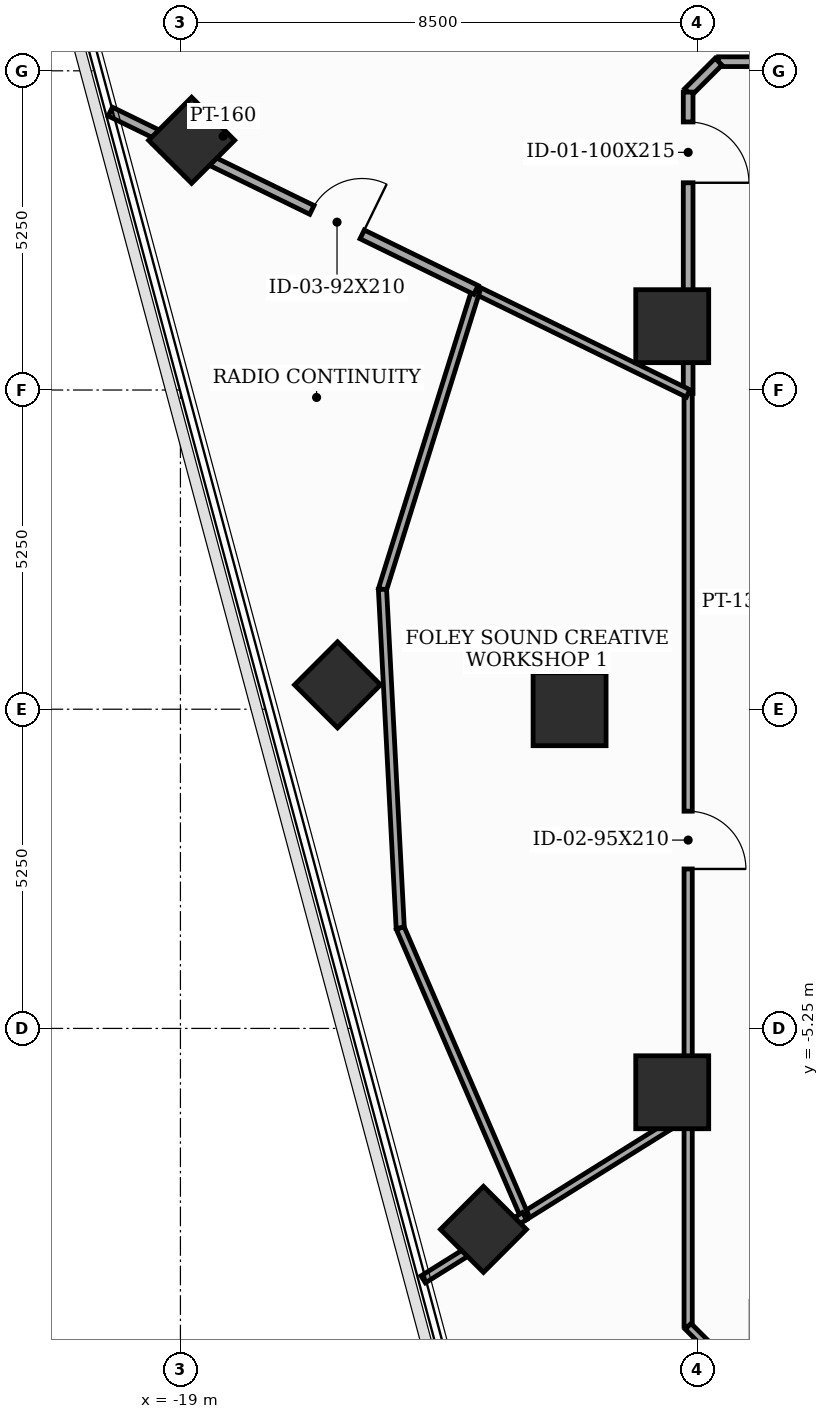
"""IFC4 building model, lengths in metres.
Left out: names, types, materials, properties, quantities, classifications, styles, units other than length and angle.
Written with IfcOpenShell. Run it as: python <this file> out.ifc"""

import sys

from ifc_helpers import new_model, si_unit, direction, frame, frame_2d, origin, origin_2d, place, context, subcontext, project, spatial, rectangle, extrude, element, fill, save


model = new_model("IFC4")
c1 = context("Model", 3, precision=1e-05, world=origin(), true_north=direction((0.0, 1.0)))
c2 = subcontext(c1, "Body", "Model", "MODEL_VIEW")
j1 = project(units=[si_unit("LENGTHUNIT", "METRE"), si_unit("PLANEANGLEUNIT", "RADIAN")], contexts=[c1])
p1 = place(None, origin())
s1 = spatial("IfcSite", under=j1, at=p1, CompositionType="ELEMENT")
p2 = place(p1, origin())
s2 = spatial("IfcBuilding", under=s1, at=p2, CompositionType="ELEMENT")
p3 = place(p2, frame((0.0, 0.0, 184.2)))
s3 = spatial("IfcBuildingStorey", under=s2, at=p3, CompositionType="ELEMENT", Elevation=184.2)
for number, where, z_axis, x_axis in (
    (1, (-10.912, 6.3, 0.0), (0.0, 0.0, 1.0), (1.0, 0.0, 0.0)),
    (2, (-12.6, 0.0, 0.0), (0.0, 0.0, 1.0), (1.0, 0.0, 0.0)),
    (3, (-10.912, -6.3, 0.0), (0.0, 0.0, 1.0), (1.0, 0.0, 0.0)),
):
    element("IfcColumn", number, at=place(p3, frame(where, z_axis=z_axis, x_axis=x_axis)), inside=s3, PredefinedType="COLUMN", context=c2, shape_type="SweptSolid", body=[
        extrude(rectangle(XDim=1.2, YDim=1.2, at=origin_2d()), origin(), (0.0, 0.0, 1.0), 3.7),
    ])
for number, where, z_axis, x_axis in (
    (4, (-18.816, 9.357, 0.0), (0.0, 0.0, 1.0), (0.707, 0.707, 0.0)),
    (5, (-16.416, 0.401, 0.0), (0.0, 0.0, 1.0), (0.707, 0.707, 0.0)),
    (6, (-14.016, -8.555, 0.0), (0.0, 0.0, 1.0), (0.707, 0.707, 0.0)),
):
    element("IfcColumn", number, at=place(p3, frame(where, z_axis=z_axis, x_axis=x_axis)), inside=s3, PredefinedType="COLUMN", context=c2, shape_type="SweptSolid", body=[
        extrude(rectangle(XDim=1.0, YDim=1.0, at=origin_2d()), origin(), (0.0, 0.0, 1.0), 3.7),
    ])
p4 = place(p3, frame((-10.65, 5.194, 0.0), z_axis=(0.0, 0.0, 1.0), x_axis=(0.0, -1.0, 0.0)))
e7 = element("IfcWall", 7, at=p4, inside=s3, PredefinedType="PARTITIONING", context=c2, shape_type="SweptSolid", body=[
    extrude(rectangle(XDim=11.849, YDim=0.135, at=frame_2d((5.925, 0.0))), origin(), (0.0, 0.0, 1.0), 2.885),
])
p5 = place(p4, frame((6.871, 0.0, 0.0)))
e8 = element("IfcOpeningElement", 8, at=p5, cuts=e7, PredefinedType="OPENING", context=c2, shape_type="SweptSolid", body=[
    extrude(rectangle(XDim=0.95, YDim=2.1, at=frame_2d((0.475, 1.05))), frame((0.0, 0.077, 0.0), z_axis=(0.0, -1.0, 0.0), x_axis=(1.0, 0.0, 0.0)), (0.0, 0.0, 1.0), 0.155),
])
p6 = place(p3, frame((-10.65, -6.655, 0.0), z_axis=(0.0, 0.0, 1.0), x_axis=(0.0, -1.0, 0.0)))
e9 = element("IfcWall", 9, at=p6, inside=s3, PredefinedType="PARTITIONING", context=c2, shape_type="SweptSolid", body=[
    extrude(rectangle(XDim=3.495, YDim=0.135, at=frame_2d((1.748, 0.0))), origin(), (0.0, 0.0, 1.0), 2.885),
])
p7 = place(p3, frame((-10.65, -10.15, 0.0), z_axis=(0.0, 0.0, 1.0), x_axis=(0.707106781187, -0.707106781187, 0.0)))
e10 = element("IfcWall", 10, at=p7, inside=s3, PredefinedType="PARTITIONING", context=c2, shape_type="SweptSolid", body=[
    extrude(rectangle(XDim=0.707, YDim=0.135, at=frame_2d((0.354, 0.0))), origin(), (0.0, 0.0, 1.0), 3.5),
])
p8 = place(p3, frame((-2.264, 10.65, 0.0), z_axis=(0.0, 0.0, 1.0), x_axis=(-1.0, 0.0, 0.0)))
e11 = element("IfcWall", 11, at=p8, inside=s3, PredefinedType="PARTITIONING", context=c2, shape_type="SweptSolid", body=[
    extrude(rectangle(XDim=7.886, YDim=0.16, at=frame_2d((3.943, 0.0))), origin(), (0.0, 0.0, 1.0), 2.885),
])
p9 = place(p3, frame((-10.15, 10.65, 0.0), z_axis=(0.0, 0.0, 1.0), x_axis=(-0.707106781187, -0.707106781187, 0.0)))
e12 = element("IfcWall", 12, at=p9, inside=s3, PredefinedType="PARTITIONING", context=c2, shape_type="SweptSolid", body=[
    extrude(rectangle(XDim=0.707, YDim=0.16, at=frame_2d((0.354, 0.0))), origin(), (0.0, 0.0, 1.0), 3.5),
])
p10 = place(p3, frame((-10.65, 10.15, 0.0), z_axis=(0.0, 0.0, 1.0), x_axis=(0.0, -1.0, 0.0)))
e13 = element("IfcWall", 13, at=p10, inside=s3, PredefinedType="PARTITIONING", context=c2, shape_type="SweptSolid", body=[
    extrude(rectangle(XDim=4.956, YDim=0.16, at=frame_2d((2.478, 0.0))), origin(), (0.0, 0.0, 1.0), 2.885),
])
p11 = place(p10, frame((0.491, 0.0, 0.0)))
e14 = element("IfcOpeningElement", 14, at=p11, cuts=e13, PredefinedType="OPENING", context=c2, shape_type="SweptSolid", body=[
    extrude(rectangle(XDim=1.0, YDim=2.15, at=frame_2d((0.5, 1.075))), frame((0.0, 0.09, 0.0), z_axis=(0.0, -1.0, 0.0), x_axis=(1.0, 0.0, 0.0)), (0.0, 0.0, 1.0), 0.18),
])
p12 = place(p3, frame((-13.341, -8.336, 0.0), z_axis=(0.0, 0.0, 1.0), x_axis=(0.848149563096, 0.529756848582, 0.0)))
e15 = element("IfcWall", 15, at=p12, inside=s3, PredefinedType="PARTITIONING", context=c2, shape_type="SweptSolid", body=[
    extrude(rectangle(XDim=3.173, YDim=0.135, at=frame_2d((1.586, 0.0))), origin(), (0.0, 0.0, 1.0), 2.885),
])
p13 = place(p3, frame((-10.65, 5.194, 0.0), z_axis=(0.0, 0.0, 1.0), x_axis=(-0.898773885441, 0.438412480261, 0.0)))
e16 = element("IfcWall", 16, at=p13, inside=s3, PredefinedType="PARTITIONING", context=c2, shape_type="SweptSolid", body=[
    extrude(rectangle(XDim=3.882, YDim=0.135, at=frame_2d((1.941, 0.0))), origin(), (0.0, 0.0, 1.0), 2.885),
])
p14 = place(p3, frame((-14.139, 6.896, 0.0), z_axis=(0.0, 0.0, 1.0), x_axis=(-0.298099863076, -0.954534688544, 0.0)))
e17 = element("IfcWall", 17, at=p14, inside=s3, PredefinedType="PARTITIONING", context=c2, shape_type="SweptSolid", body=[
    extrude(rectangle(XDim=5.16, YDim=0.135, at=frame_2d((2.58, 0.0))), origin(), (0.0, 0.0, 1.0), 3.5),
])
p15 = place(p3, frame((-15.677, 1.971, 0.0), z_axis=(0.0, 0.0, 1.0), x_axis=(0.052349772407, -0.998628810584, 0.0)))
e18 = element("IfcWall", 18, at=p15, inside=s3, PredefinedType="PARTITIONING", context=c2, shape_type="SweptSolid", body=[
    extrude(rectangle(XDim=5.578, YDim=0.135, at=frame_2d((2.789, 0.0))), origin(), (0.0, 0.0, 1.0), 2.985),
])
p16 = place(p3, frame((-15.385, -3.599, 0.0), z_axis=(0.0, 0.0, 1.0), x_axis=(0.396191247476, -0.918168010455, 0.0)))
e19 = element("IfcWall", 19, at=p16, inside=s3, PredefinedType="PARTITIONING", context=c2, shape_type="SweptSolid", body=[
    extrude(rectangle(XDim=5.159, YDim=0.135, at=frame_2d((2.58, 0.0))), origin(), (0.0, 0.0, 1.0), 2.985),
])
p17 = place(p3, frame((-13.341, -8.336, 0.0), z_axis=(0.0, 0.0, 1.0), x_axis=(-0.848033204961, -0.529943094382, 0.0)))
e20 = element("IfcWall", 20, at=p17, inside=s3, PredefinedType="PARTITIONING", context=c2, shape_type="SweptSolid", body=[
    extrude(rectangle(XDim=1.965, YDim=0.135, at=frame_2d((0.982, 0.0))), origin(), (0.0, 0.0, 1.0), 2.985),
])
p18 = place(p3, frame((-20.154, 9.829, 0.0), z_axis=(0.0, 0.0, 1.0), x_axis=(0.898812268895, -0.43833378296, 0.0)))
e21 = element("IfcWall", 21, at=p18, inside=s3, PredefinedType="PARTITIONING", context=c2, shape_type="SweptSolid", body=[
    extrude(rectangle(XDim=6.692, YDim=0.16, at=frame_2d((3.346, 0.0))), origin(), (0.0, 0.0, 1.0), 2.985),
])
p19 = place(p18, frame((3.689, 0.0, 0.0)))
e22 = element("IfcOpeningElement", 22, at=p19, cuts=e21, PredefinedType="OPENING", context=c2, shape_type="SweptSolid", body=[
    extrude(rectangle(XDim=0.92, YDim=2.1, at=frame_2d((0.46, 1.05))), frame((0.0, 0.09, 0.0), z_axis=(0.0, -1.0, 0.0), x_axis=(1.0, 0.0, 0.0)), (0.0, 0.0, 1.0), 0.18),
])
p20 = place(p5, origin())
e23 = element("IfcDoor", 23, at=p20, inside=s3, OperationType="SINGLE_SWING_RIGHT", PredefinedType="DOOR", context=c2, shape_type="SweptSolid", body=[
    extrude(rectangle(XDim=0.95, YDim=2.1, at=frame_2d((0.475, 1.05))), frame((0.0, 0.025, 0.0), z_axis=(0.0, -1.0, 0.0), x_axis=(1.0, 0.0, 0.0)), (0.0, 0.0, 1.0), 0.05),
])
fill(e8, e23)
p21 = place(p11, origin())
e24 = element("IfcDoor", 24, at=p21, inside=s3, OperationType="SINGLE_SWING_RIGHT", PredefinedType="DOOR", context=c2, shape_type="SweptSolid", body=[
    extrude(rectangle(XDim=1.0, YDim=2.15, at=frame_2d((0.5, 1.075))), frame((0.0, 0.025, 0.0), z_axis=(0.0, -1.0, 0.0), x_axis=(1.0, 0.0, 0.0)), (0.0, 0.0, 1.0), 0.05),
])
fill(e14, e24)
p22 = place(p19, origin())
e25 = element("IfcDoor", 25, at=p22, inside=s3, OperationType="SINGLE_SWING_RIGHT", PredefinedType="DOOR", context=c2, shape_type="SweptSolid", body=[
    extrude(rectangle(XDim=0.92, YDim=2.1, at=frame_2d((0.46, 1.05))), frame((0.0, 0.025, 0.0), z_axis=(0.0, -1.0, 0.0), x_axis=(1.0, 0.0, 0.0)), (0.0, 0.0, 1.0), 0.05),
])
fill(e22, e25)
save(model, sys.argv[1])
